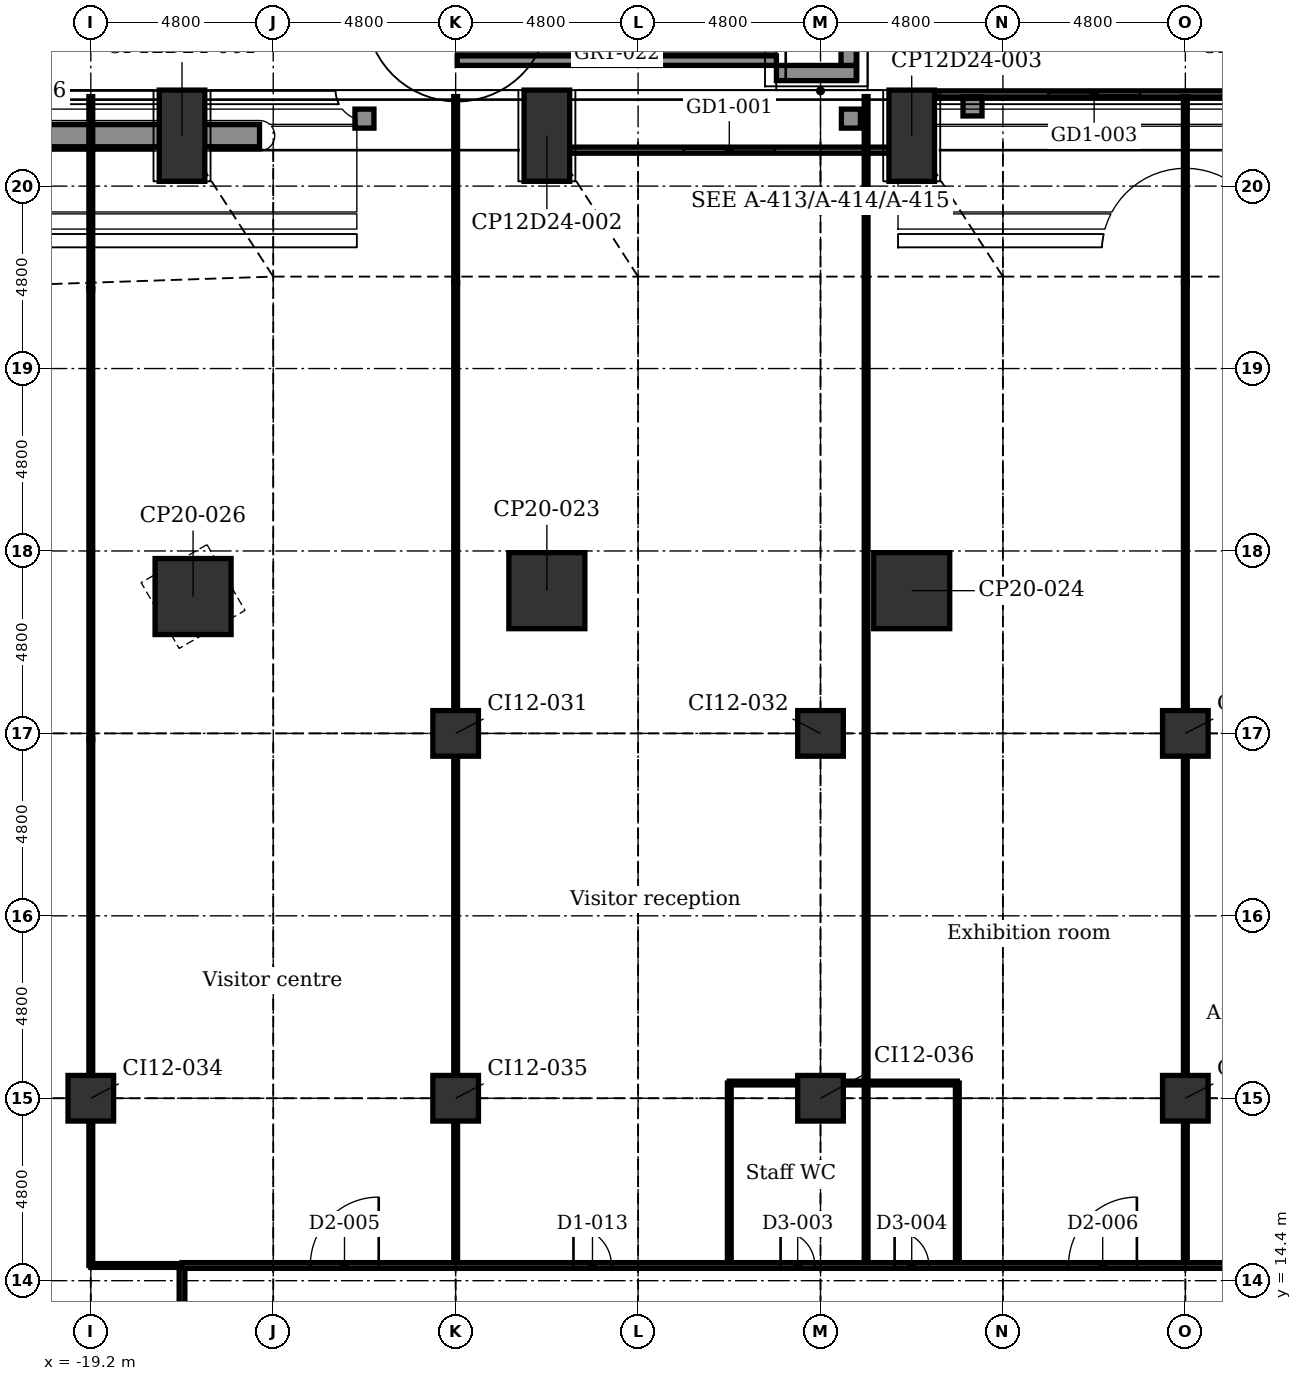
"""IFC4 building model, lengths in metres.
Left out: names, types, materials, properties, quantities, classifications, styles, units other than length and angle.
Written with IfcOpenShell. Run it as: python <this file> out.ifc"""

import sys

from ifc_helpers import new_model, si_unit, direction, frame, frame_2d, origin, origin_2d, place, context, subcontext, project, spatial, polyline, rectangle, outline, extrude, element, fill, save


model = new_model("IFC4")
c1 = context("Model", 3, precision=1e-05, world=origin(), true_north=direction((0.0, 1.0)))
c2 = subcontext(c1, "Body", "Model", "MODEL_VIEW")
j1 = project(units=[si_unit("LENGTHUNIT", "METRE"), si_unit("PLANEANGLEUNIT", "RADIAN")], contexts=[c1])
p1 = place(None, origin())
s1 = spatial("IfcSite", under=j1, at=p1, CompositionType="ELEMENT")
p2 = place(p1, origin())
s2 = spatial("IfcBuilding", under=s1, at=p2, CompositionType="ELEMENT")
p3 = place(p2, frame((0.0, 0.0, 7.0)))
s3 = spatial("IfcBuildingStorey", under=s2, at=p3, CompositionType="ELEMENT", Elevation=7.0)
for number, where, z_axis, x_axis in (
    (1, (-16.8, 44.526, -0.3), (0.0, 0.0, 1.0), (1.0, 0.0, 0.0)),
    (2, (-7.2, 44.526, -0.3), (0.0, 0.0, 1.0), (1.0, 0.0, 0.0)),
    (3, (2.4, 44.526, -0.3), (0.0, 0.0, 1.0), (1.0, 0.0, 0.0)),
):
    element("IfcColumn", number, at=place(p3, frame(where, z_axis=z_axis, x_axis=x_axis)), inside=s3, PredefinedType="COLUMN", context=c2, shape_type="SweptSolid", body=[
        extrude(rectangle(XDim=1.2, YDim=2.4, at=origin_2d()), origin(), (0.0, 0.0, 1.0), 5.4),
    ])
for number, where, z_axis, x_axis in (
    (4, (-16.509, 32.401, -0.3), (0.0, 0.0, 1.0), (0.866, 0.5, 0.0)),
    (5, (-7.2, 32.555, -0.3), (0.0, 0.0, 1.0), (1.0, 0.0, 0.0)),
    (6, (2.4, 32.555, -0.3), (0.0, 0.0, 1.0), (1.0, 0.0, 0.0)),
):
    element("IfcColumn", number, at=place(p3, frame(where, z_axis=z_axis, x_axis=x_axis)), inside=s3, PredefinedType="COLUMN", context=c2, shape_type="SweptSolid", body=[
        extrude(rectangle(XDim=2.0, YDim=2.0, at=origin_2d()), origin(), (0.0, 0.0, 1.0), 5.4),
    ])
for number, where, z_axis, x_axis in (
    (7, (-19.2, 19.2, -0.3), (0.0, 0.0, 1.0), (1.0, 0.0, 0.0)),
    (8, (-9.6, 19.2, -0.3), (0.0, 0.0, 1.0), (1.0, 0.0, 0.0)),
    (9, (-9.6, 28.8, -0.3), (0.0, 0.0, 1.0), (1.0, 0.0, 0.0)),
    (10, (0.0, 19.2, -0.3), (0.0, 0.0, 1.0), (1.0, 0.0, 0.0)),
    (11, (0.0, 28.8, -0.3), (0.0, 0.0, 1.0), (1.0, 0.0, 0.0)),
    (12, (9.6, 19.2, -0.3), (0.0, 0.0, 1.0), (1.0, 0.0, 0.0)),
    (13, (9.6, 28.8, -0.3), (0.0, 0.0, 1.0), (1.0, 0.0, 0.0)),
):
    element("IfcColumn", number, at=place(p3, frame(where, z_axis=z_axis, x_axis=x_axis)), inside=s3, PredefinedType="COLUMN", context=c2, shape_type="SweptSolid", body=[
        extrude(rectangle(XDim=1.2, YDim=1.2, at=origin_2d()), origin(), (0.0, 0.0, 1.0), 5.4),
    ])
p4 = place(p3, frame((-6.598, 44.146, 0.0), z_axis=(0.0, 0.0, 1.0), x_axis=(1.0, 0.0, 0.0)))
e14 = element("IfcWall", 14, at=p4, inside=s3, PredefinedType="PARTITIONING", context=c2, shape_type="SweptSolid", body=[
    extrude(rectangle(XDim=8.396, YDim=0.16, at=frame_2d((4.198, 0.0))), origin(), (0.0, 0.0, 1.0), 5.1),
])
p5 = place(p4, frame((2.998, 0.0, 0.0)))
e15 = element("IfcOpeningElement", 15, at=p5, cuts=e14, PredefinedType="OPENING", context=c2, shape_type="SweptSolid", body=[
    extrude(rectangle(XDim=2.4, YDim=2.4, at=frame_2d((1.2, 1.2))), frame((0.0, 0.09, 0.0), z_axis=(0.0, -1.0, 0.0), x_axis=(1.0, 0.0, 0.0)), (0.0, 0.0, 1.0), 0.18),
])
p6 = place(p3, frame((3.004, 45.626, 0.0), z_axis=(0.0, 0.0, 1.0), x_axis=(1.0, 0.0, 0.0)))
e16 = element("IfcWall", 16, at=p6, inside=s3, PredefinedType="PARTITIONING", context=c2, shape_type="SweptSolid", body=[
    extrude(rectangle(XDim=8.392, YDim=0.16, at=frame_2d((4.196, 0.0))), origin(), (0.0, 0.0, 1.0), 5.1),
])
p7 = place(p6, frame((2.996, 0.0, 0.0)))
e17 = element("IfcOpeningElement", 17, at=p7, cuts=e16, PredefinedType="OPENING", context=c2, shape_type="SweptSolid", body=[
    extrude(rectangle(XDim=2.4, YDim=2.4, at=frame_2d((1.2, 1.2))), frame((0.0, 0.09, 0.0), z_axis=(0.0, -1.0, 0.0), x_axis=(1.0, 0.0, 0.0)), (0.0, 0.0, 1.0), 0.18),
])
p8 = place(p3, frame((-20.761, 44.526, 5.4), z_axis=(0.0, 0.0, 1.0), x_axis=(1.0, 0.0, 0.0)))
e18 = element("IfcWall", 18, at=p8, inside=s3, PredefinedType="USERDEFINED", context=c2, shape_type="SweptSolid", body=[
    extrude(rectangle(XDim=6.0, YDim=0.6, at=frame_2d((3.0, 0.0))), origin(), (0.0, 0.0, 1.0), 0.7),
])
p9 = place(p3, frame((-9.56, 46.501, 0.0), z_axis=(0.0, 0.0, 1.0), x_axis=(1.0, 0.0, 0.0)))
e19 = element("IfcWall", 19, at=p9, inside=s3, PredefinedType="SOLIDWALL", context=c2, shape_type="SweptSolid", body=[
    extrude(outline(polyline([(0.0, 0.0), (8.4, 0.0), (8.4, 5.5), (0.0, 0.274), (0.0, 0.0)])), frame((0.0, 0.125, 0.0), z_axis=(0.0, -1.0, 0.0), x_axis=(1.0, 0.0, 0.0)), (0.0, 0.0, 1.0), 0.25),
])
p10 = place(p3, frame((-1.16, 46.176, 0.45), z_axis=(0.0, 0.0, 1.0), x_axis=(1.0, 0.0, 0.0)))
e20 = element("IfcWall", 20, at=p10, inside=s3, PredefinedType="SOLIDWALL", context=c2, shape_type="SweptSolid", body=[
    extrude(rectangle(XDim=2.1, YDim=0.4, at=frame_2d((1.05, 0.0))), origin(), (0.0, 0.0, 1.0), 4.75),
])
p11 = place(p3, frame((0.74, 46.376, 0.45), z_axis=(0.0, 0.0, 1.0), x_axis=(0.0, 1.0, 0.0)))
e21 = element("IfcWall", 21, at=p11, inside=s3, PredefinedType="SOLIDWALL", context=c2, shape_type="SweptSolid", body=[
    extrude(rectangle(XDim=2.25, YDim=0.4, at=frame_2d((1.125, 0.0))), origin(), (0.0, 0.0, 1.0), 4.75),
])
for number, where, z_axis, x_axis in (
    (22, (-12.25, 44.976, 0.0), (0.0, 0.0, 1.0), (1.0, 0.0, 0.0)),
    (23, (0.55, 44.976, 0.0), (0.0, 0.0, 1.0), (1.0, 0.0, 0.0)),
    (24, (3.75, 45.296, 0.0), (0.0, 0.0, 1.0), (1.0, 0.0, 0.0)),
):
    element("IfcWall", number, at=place(p3, frame(where, z_axis=z_axis, x_axis=x_axis)), inside=s3, PredefinedType="SOLIDWALL", context=c2, shape_type="SweptSolid", body=[
        extrude(rectangle(XDim=0.5, YDim=0.5, at=frame_2d((0.25, 0.0))), origin(), (0.0, 0.0, 1.0), 4.8),
    ])
p12 = place(p3, frame((9.6, 29.36, 0.0), z_axis=(0.0, 0.0, 1.0), x_axis=(0.0, 1.0, 0.0)))
e25 = element("IfcWall", 25, at=p12, inside=s3, PredefinedType="PARTITIONING", context=c2, shape_type="SweptSolid", body=[
    extrude(rectangle(XDim=11.299, YDim=0.1, at=frame_2d((5.649, 0.0))), origin(), (0.0, 0.0, 1.0), 4.567),
])
p13 = place(p3, frame((9.6, 14.8, 0.0), z_axis=(0.0, 0.0, 1.0), x_axis=(0.0, 1.0, 0.0)))
e26 = element("IfcWall", 26, at=p13, inside=s3, PredefinedType="PARTITIONING", context=c2, shape_type="SweptSolid", body=[
    extrude(rectangle(XDim=3.84, YDim=0.1, at=frame_2d((1.92, 0.0))), origin(), (0.0, 0.0, 1.0), 4.693),
])
p14 = place(p3, frame((9.6, 18.64, 0.0), z_axis=(0.0, 0.0, 1.0), x_axis=(0.0, 1.0, 0.0)))
e27 = element("IfcWall", 27, at=p14, inside=s3, PredefinedType="PARTITIONING", context=c2, shape_type="SweptSolid", body=[
    extrude(rectangle(XDim=1.12, YDim=0.1, at=frame_2d((0.56, 0.0))), origin(), (0.0, 0.0, 1.0), 5.1),
])
p15 = place(p3, frame((9.6, 19.76, 0.0), z_axis=(0.0, 0.0, 1.0), x_axis=(0.0, 1.0, 0.0)))
e28 = element("IfcWall", 28, at=p15, inside=s3, PredefinedType="PARTITIONING", context=c2, shape_type="SweptSolid", body=[
    extrude(rectangle(XDim=8.48, YDim=0.1, at=frame_2d((4.24, 0.0))), origin(), (0.0, 0.0, 1.0), 4.693),
])
p16 = place(p3, frame((9.6, 28.24, 0.0), z_axis=(0.0, 0.0, 1.0), x_axis=(0.0, 1.0, 0.0)))
e29 = element("IfcWall", 29, at=p16, inside=s3, PredefinedType="PARTITIONING", context=c2, shape_type="SweptSolid", body=[
    extrude(rectangle(XDim=1.12, YDim=0.1, at=frame_2d((0.56, 0.0))), origin(), (0.0, 0.0, 1.0), 5.1),
])
p17 = place(p3, frame((9.6, 40.659, 0.0), z_axis=(0.0, 0.0, 1.0), x_axis=(0.0, 1.0, 0.0)))
e30 = element("IfcWall", 30, at=p17, inside=s3, PredefinedType="PARTITIONING", context=c2, shape_type="SweptSolid", body=[
    extrude(rectangle(XDim=4.897, YDim=0.1, at=frame_2d((2.448, 0.0))), origin(), (0.0, 0.0, 1.0), 5.1),
])
p18 = place(p3, frame((3.6, 14.8, 0.0), z_axis=(0.0, 0.0, 1.0), x_axis=(0.0, 1.0, 0.0)))
e31 = element("IfcWall", 31, at=p18, inside=s3, PredefinedType="PARTITIONING", context=c2, shape_type="SweptSolid", body=[
    extrude(rectangle(XDim=4.8, YDim=0.1, at=frame_2d((2.4, 0.0))), origin(), (0.0, 0.0, 1.0), 5.1),
])
p19 = place(p3, frame((1.2, 14.8, 0.0), z_axis=(0.0, 0.0, 1.0), x_axis=(0.0, 1.0, 0.0)))
e32 = element("IfcWall", 32, at=p19, inside=s3, PredefinedType="PARTITIONING", context=c2, shape_type="SweptSolid", body=[
    extrude(rectangle(XDim=30.756, YDim=0.1, at=frame_2d((15.378, 0.0))), origin(), (0.0, 0.0, 1.0), 5.1),
])
p20 = place(p3, frame((-2.4, 14.8, 0.0), z_axis=(0.0, 0.0, 1.0), x_axis=(0.0, 1.0, 0.0)))
e33 = element("IfcWall", 33, at=p20, inside=s3, PredefinedType="PARTITIONING", context=c2, shape_type="SweptSolid", body=[
    extrude(rectangle(XDim=4.8, YDim=0.1, at=frame_2d((2.4, 0.0))), origin(), (0.0, 0.0, 1.0), 5.1),
])
p21 = place(p3, frame((-9.6, 29.36, 0.0), z_axis=(0.0, 0.0, 1.0), x_axis=(0.0, 1.0, 0.0)))
e34 = element("IfcWall", 34, at=p21, inside=s3, PredefinedType="PARTITIONING", context=c2, shape_type="SweptSolid", body=[
    extrude(rectangle(XDim=11.299, YDim=0.1, at=frame_2d((5.649, 0.0))), origin(), (0.0, 0.0, 1.0), 4.567),
])
p22 = place(p3, frame((-9.6, 14.8, 0.0), z_axis=(0.0, 0.0, 1.0), x_axis=(0.0, 1.0, 0.0)))
e35 = element("IfcWall", 35, at=p22, inside=s3, PredefinedType="PARTITIONING", context=c2, shape_type="SweptSolid", body=[
    extrude(rectangle(XDim=3.84, YDim=0.1, at=frame_2d((1.92, 0.0))), origin(), (0.0, 0.0, 1.0), 4.693),
])
p23 = place(p3, frame((-9.6, 18.64, 0.0), z_axis=(0.0, 0.0, 1.0), x_axis=(0.0, 1.0, 0.0)))
e36 = element("IfcWall", 36, at=p23, inside=s3, PredefinedType="PARTITIONING", context=c2, shape_type="SweptSolid", body=[
    extrude(rectangle(XDim=1.12, YDim=0.1, at=frame_2d((0.56, 0.0))), origin(), (0.0, 0.0, 1.0), 5.1),
])
p24 = place(p3, frame((-9.6, 19.76, 0.0), z_axis=(0.0, 0.0, 1.0), x_axis=(0.0, 1.0, 0.0)))
e37 = element("IfcWall", 37, at=p24, inside=s3, PredefinedType="PARTITIONING", context=c2, shape_type="SweptSolid", body=[
    extrude(rectangle(XDim=8.48, YDim=0.1, at=frame_2d((4.24, 0.0))), origin(), (0.0, 0.0, 1.0), 4.693),
])
p25 = place(p3, frame((-9.6, 28.24, 0.0), z_axis=(0.0, 0.0, 1.0), x_axis=(0.0, 1.0, 0.0)))
e38 = element("IfcWall", 38, at=p25, inside=s3, PredefinedType="PARTITIONING", context=c2, shape_type="SweptSolid", body=[
    extrude(rectangle(XDim=1.12, YDim=0.1, at=frame_2d((0.56, 0.0))), origin(), (0.0, 0.0, 1.0), 5.1),
])
p26 = place(p3, frame((-9.6, 40.659, 0.0), z_axis=(0.0, 0.0, 1.0), x_axis=(0.0, 1.0, 0.0)))
e39 = element("IfcWall", 39, at=p26, inside=s3, PredefinedType="PARTITIONING", context=c2, shape_type="SweptSolid", body=[
    extrude(rectangle(XDim=4.897, YDim=0.1, at=frame_2d((2.448, 0.0))), origin(), (0.0, 0.0, 1.0), 5.1),
])
p27 = place(p3, frame((-16.8, 3.95, 0.0), z_axis=(0.0, 0.0, 1.0), x_axis=(0.0, 1.0, 0.0)))
e40 = element("IfcWall", 40, at=p27, inside=s3, PredefinedType="PARTITIONING", context=c2, shape_type="SweptSolid", body=[
    extrude(rectangle(XDim=10.85, YDim=0.15, at=frame_2d((5.425, 0.0))), origin(), (0.0, 0.0, 1.0), 5.1),
])
p28 = place(p27, frame((1.25, 0.0, 0.0)))
e41 = element("IfcOpeningElement", 41, at=p28, cuts=e40, PredefinedType="OPENING", context=c2, shape_type="SweptSolid", body=[
    extrude(rectangle(XDim=1.0, YDim=2.1, at=frame_2d((0.5, 1.05))), frame((0.0, 0.085, 0.0), z_axis=(0.0, -1.0, 0.0), x_axis=(1.0, 0.0, 0.0)), (0.0, 0.0, 1.0), 0.17),
])
p29 = place(p27, frame((7.95, 0.0, 0.0)))
e42 = element("IfcOpeningElement", 42, at=p29, cuts=e40, PredefinedType="OPENING", context=c2, shape_type="SweptSolid", body=[
    extrude(rectangle(XDim=1.0, YDim=2.1, at=frame_2d((0.5, 1.05))), frame((0.0, 0.085, 0.0), z_axis=(0.0, -1.0, 0.0), x_axis=(1.0, 0.0, 0.0)), (0.0, 0.0, 1.0), 0.17),
])
p30 = place(p3, frame((-19.2, 28.64, 0.0), z_axis=(0.0, 0.0, 1.0), x_axis=(0.0, 1.0, 0.0)))
e43 = element("IfcWall", 43, at=p30, inside=s3, PredefinedType="PARTITIONING", context=c2, shape_type="SweptSolid", body=[
    extrude(rectangle(XDim=11.858, YDim=0.1, at=frame_2d((5.929, 0.0))), origin(), (0.0, 0.0, 1.0), 4.567),
])
p31 = place(p3, frame((-19.2, 14.8, 0.0), z_axis=(0.0, 0.0, 1.0), x_axis=(0.0, 1.0, 0.0)))
e44 = element("IfcWall", 44, at=p31, inside=s3, PredefinedType="PARTITIONING", context=c2, shape_type="SweptSolid", body=[
    extrude(rectangle(XDim=3.84, YDim=0.1, at=frame_2d((1.92, 0.0))), origin(), (0.0, 0.0, 1.0), 4.693),
])
p32 = place(p3, frame((-19.2, 18.64, 0.0), z_axis=(0.0, 0.0, 1.0), x_axis=(0.0, 1.0, 0.0)))
e45 = element("IfcWall", 45, at=p32, inside=s3, PredefinedType="PARTITIONING", context=c2, shape_type="SweptSolid", body=[
    extrude(rectangle(XDim=1.12, YDim=0.1, at=frame_2d((0.56, 0.0))), origin(), (0.0, 0.0, 1.0), 5.1),
])
p33 = place(p3, frame((-19.2, 19.76, 0.0), z_axis=(0.0, 0.0, 1.0), x_axis=(0.0, 1.0, 0.0)))
e46 = element("IfcWall", 46, at=p33, inside=s3, PredefinedType="PARTITIONING", context=c2, shape_type="SweptSolid", body=[
    extrude(rectangle(XDim=8.88, YDim=0.1, at=frame_2d((4.44, 0.0))), origin(), (0.0, 0.0, 1.0), 4.693),
])
p34 = place(p3, frame((-19.2, 40.498, 0.0), z_axis=(0.0, 0.0, 1.0), x_axis=(0.0, 1.0, 0.0)))
e47 = element("IfcWall", 47, at=p34, inside=s3, PredefinedType="PARTITIONING", context=c2, shape_type="SweptSolid", body=[
    extrude(rectangle(XDim=5.058, YDim=0.1, at=frame_2d((2.529, 0.0))), origin(), (0.0, 0.0, 1.0), 5.1),
])
p35 = place(p3, frame((-19.2, 14.8, 0.0), z_axis=(0.0, 0.0, 1.0), x_axis=(1.0, 0.0, 0.0)))
e48 = element("IfcWall", 48, at=p35, inside=s3, PredefinedType="PARTITIONING", context=c2, shape_type="SweptSolid", body=[
    extrude(rectangle(XDim=2.4, YDim=0.1, at=frame_2d((1.2, 0.0))), origin(), (0.0, 0.0, 1.0), 5.1),
])
p36 = place(p3, frame((-16.8, 14.8, 0.0), z_axis=(0.0, 0.0, 1.0), x_axis=(1.0, 0.0, 0.0)))
e49 = element("IfcWall", 49, at=p36, inside=s3, PredefinedType="PARTITIONING", context=c2, shape_type="SweptSolid", body=[
    extrude(rectangle(XDim=33.6, YDim=0.15, at=frame_2d((16.8, 0.0))), origin(), (0.0, 0.0, 1.0), 5.1),
])
p37 = place(p36, frame((15.75, 0.0, 0.0)))
e50 = element("IfcOpeningElement", 50, at=p37, cuts=e49, PredefinedType="OPENING", context=c2, shape_type="SweptSolid", body=[
    extrude(rectangle(XDim=0.9, YDim=2.1, at=frame_2d((0.45, 1.05))), frame((0.0, 0.085, 0.0), z_axis=(0.0, -1.0, 0.0), x_axis=(1.0, 0.0, 0.0)), (0.0, 0.0, 1.0), 0.17),
])
p38 = place(p36, frame((18.75, 0.0, 0.0)))
e51 = element("IfcOpeningElement", 51, at=p38, cuts=e49, PredefinedType="OPENING", context=c2, shape_type="SweptSolid", body=[
    extrude(rectangle(XDim=0.9, YDim=2.1, at=frame_2d((0.45, 1.05))), frame((0.0, 0.085, 0.0), z_axis=(0.0, -1.0, 0.0), x_axis=(1.0, 0.0, 0.0)), (0.0, 0.0, 1.0), 0.17),
])
p39 = place(p36, frame((3.375, 0.0, 0.0)))
e52 = element("IfcOpeningElement", 52, at=p39, cuts=e49, PredefinedType="OPENING", context=c2, shape_type="SweptSolid", body=[
    extrude(rectangle(XDim=1.8, YDim=2.1, at=frame_2d((0.9, 1.05))), frame((0.0, 0.085, 0.0), z_axis=(0.0, -1.0, 0.0), x_axis=(1.0, 0.0, 0.0)), (0.0, 0.0, 1.0), 0.17),
])
p40 = place(p36, frame((10.3, 0.0, 0.0)))
e53 = element("IfcOpeningElement", 53, at=p40, cuts=e49, PredefinedType="OPENING", context=c2, shape_type="SweptSolid", body=[
    extrude(rectangle(XDim=1.0, YDim=2.1, at=frame_2d((0.5, 1.05))), frame((0.0, 0.085, 0.0), z_axis=(0.0, -1.0, 0.0), x_axis=(1.0, 0.0, 0.0)), (0.0, 0.0, 1.0), 0.17),
])
p41 = place(p36, frame((23.325, 0.0, 0.0)))
e54 = element("IfcOpeningElement", 54, at=p41, cuts=e49, PredefinedType="OPENING", context=c2, shape_type="SweptSolid", body=[
    extrude(rectangle(XDim=1.8, YDim=2.1, at=frame_2d((0.9, 1.05))), frame((0.0, 0.085, 0.0), z_axis=(0.0, -1.0, 0.0), x_axis=(1.0, 0.0, 0.0)), (0.0, 0.0, 1.0), 0.17),
])
p42 = place(p36, frame((28.3, 0.0, 0.0)))
e55 = element("IfcOpeningElement", 55, at=p42, cuts=e49, PredefinedType="OPENING", context=c2, shape_type="SweptSolid", body=[
    extrude(rectangle(XDim=1.0, YDim=2.1, at=frame_2d((0.5, 1.05))), frame((0.0, 0.085, 0.0), z_axis=(0.0, -1.0, 0.0), x_axis=(1.0, 0.0, 0.0)), (0.0, 0.0, 1.0), 0.17),
])
p43 = place(p36, frame((32.075, 0.0, 0.0)))
e56 = element("IfcOpeningElement", 56, at=p43, cuts=e49, PredefinedType="OPENING", context=c2, shape_type="SweptSolid", body=[
    extrude(rectangle(XDim=1.0, YDim=2.1, at=frame_2d((0.5, 1.05))), frame((0.0, 0.085, 0.0), z_axis=(0.0, -1.0, 0.0), x_axis=(1.0, 0.0, 0.0)), (0.0, 0.0, 1.0), 0.17),
])
p44 = place(p3, frame((-2.4, 19.6, 0.0), z_axis=(0.0, 0.0, 1.0), x_axis=(1.0, 0.0, 0.0)))
e57 = element("IfcWall", 57, at=p44, inside=s3, PredefinedType="PARTITIONING", context=c2, shape_type="SweptSolid", body=[
    extrude(rectangle(XDim=6.0, YDim=0.1, at=frame_2d((3.0, 0.0))), origin(), (0.0, 0.0, 1.0), 5.1),
])
p45 = place(p5, origin())
e58 = element("IfcDoor", 58, at=p45, inside=s3, OperationType="DOUBLE_DOOR_SLIDING", PredefinedType="DOOR", context=c2, shape_type="SweptSolid", body=[
    extrude(rectangle(XDim=2.4, YDim=2.4, at=frame_2d((1.2, 1.2))), frame((0.0, 0.025, 0.0), z_axis=(0.0, -1.0, 0.0), x_axis=(1.0, 0.0, 0.0)), (0.0, 0.0, 1.0), 0.05),
])
fill(e15, e58)
p46 = place(p7, origin())
e59 = element("IfcDoor", 59, at=p46, inside=s3, OperationType="DOUBLE_DOOR_SLIDING", PredefinedType="DOOR", context=c2, shape_type="SweptSolid", body=[
    extrude(rectangle(XDim=2.4, YDim=2.4, at=frame_2d((1.2, 1.2))), frame((0.0, 0.025, 0.0), z_axis=(0.0, -1.0, 0.0), x_axis=(1.0, 0.0, 0.0)), (0.0, 0.0, 1.0), 0.05),
])
fill(e17, e59)
p47 = place(p37, origin())
e60 = element("IfcDoor", 60, at=p47, inside=s3, OperationType="SINGLE_SWING_LEFT", PredefinedType="DOOR", context=c2, shape_type="SweptSolid", body=[
    extrude(rectangle(XDim=0.9, YDim=2.1, at=frame_2d((0.45, 1.05))), frame((0.0, 0.025, 0.0), z_axis=(0.0, -1.0, 0.0), x_axis=(1.0, 0.0, 0.0)), (0.0, 0.0, 1.0), 0.05),
])
fill(e50, e60)
p48 = place(p38, origin())
e61 = element("IfcDoor", 61, at=p48, inside=s3, OperationType="SINGLE_SWING_LEFT", PredefinedType="DOOR", context=c2, shape_type="SweptSolid", body=[
    extrude(rectangle(XDim=0.9, YDim=2.1, at=frame_2d((0.45, 1.05))), frame((0.0, 0.025, 0.0), z_axis=(0.0, -1.0, 0.0), x_axis=(1.0, 0.0, 0.0)), (0.0, 0.0, 1.0), 0.05),
])
fill(e51, e61)
p49 = place(p39, origin())
e62 = element("IfcDoor", 62, at=p49, inside=s3, OperationType="SINGLE_SWING_RIGHT", PredefinedType="DOOR", context=c2, shape_type="SweptSolid", body=[
    extrude(rectangle(XDim=1.8, YDim=2.1, at=frame_2d((0.9, 1.05))), frame((0.0, 0.025, 0.0), z_axis=(0.0, -1.0, 0.0), x_axis=(1.0, 0.0, 0.0)), (0.0, 0.0, 1.0), 0.05),
])
fill(e52, e62)
p50 = place(p40, origin())
e63 = element("IfcDoor", 63, at=p50, inside=s3, OperationType="SINGLE_SWING_LEFT", PredefinedType="DOOR", context=c2, shape_type="SweptSolid", body=[
    extrude(rectangle(XDim=1.0, YDim=2.1, at=frame_2d((0.5, 1.05))), frame((0.0, 0.025, 0.0), z_axis=(0.0, -1.0, 0.0), x_axis=(1.0, 0.0, 0.0)), (0.0, 0.0, 1.0), 0.05),
])
fill(e53, e63)
p51 = place(p41, origin())
e64 = element("IfcDoor", 64, at=p51, inside=s3, OperationType="SINGLE_SWING_RIGHT", PredefinedType="DOOR", context=c2, shape_type="SweptSolid", body=[
    extrude(rectangle(XDim=1.8, YDim=2.1, at=frame_2d((0.9, 1.05))), frame((0.0, 0.025, 0.0), z_axis=(0.0, -1.0, 0.0), x_axis=(1.0, 0.0, 0.0)), (0.0, 0.0, 1.0), 0.05),
])
fill(e54, e64)
save(model, sys.argv[1])
